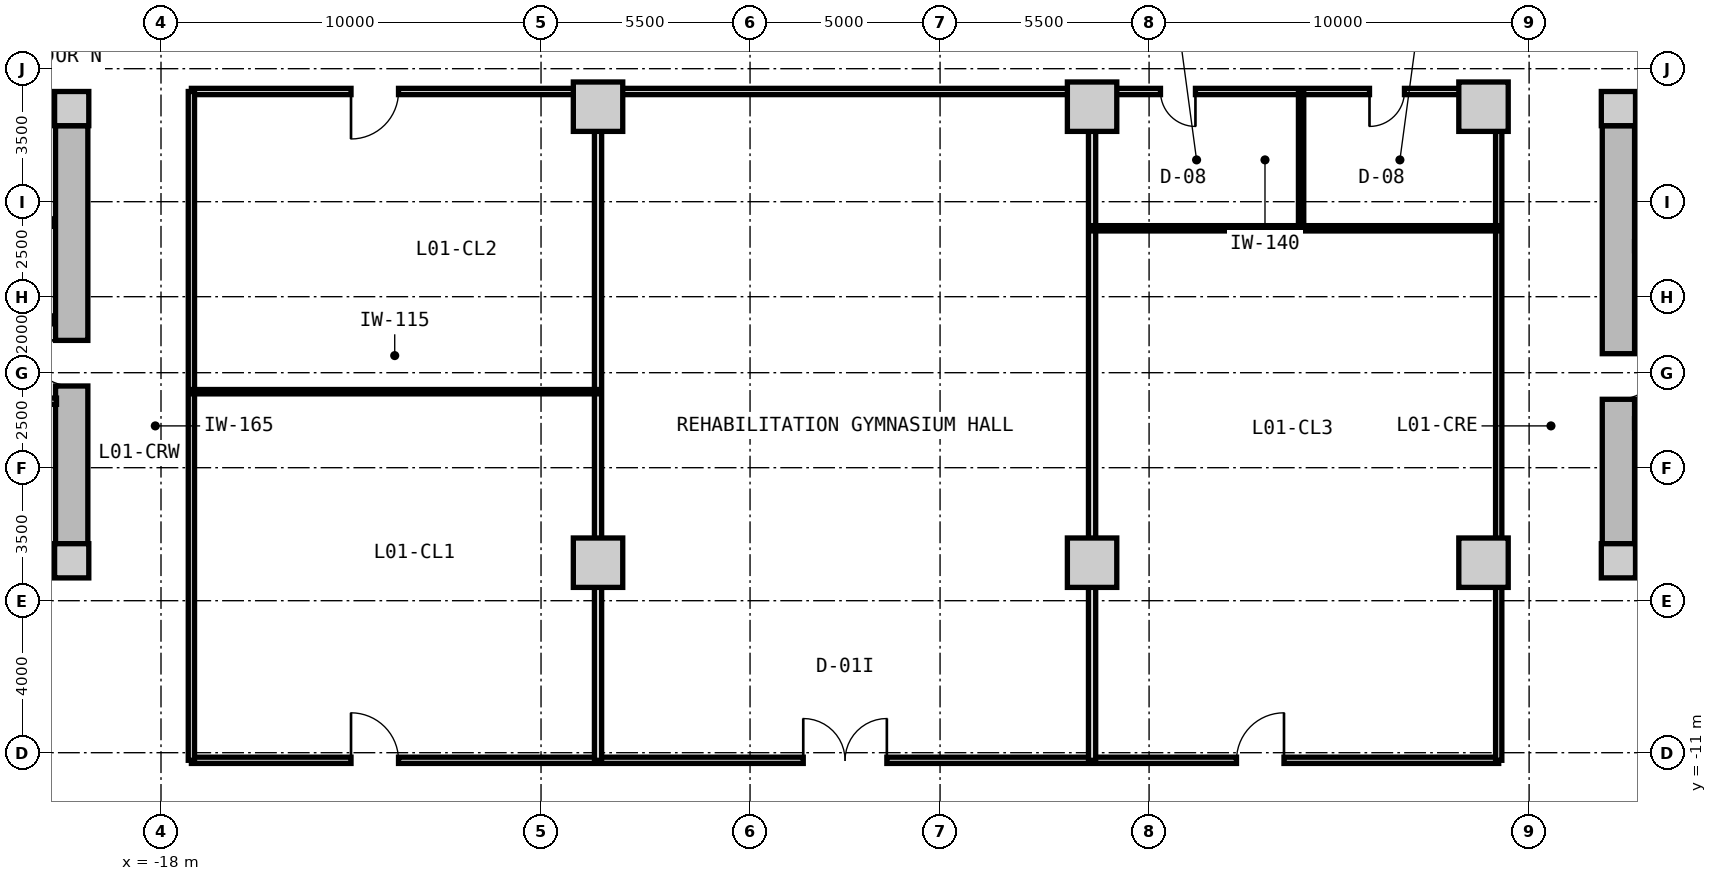
"""IFC4 building model, lengths in metres.
Left out: names, types, materials, properties, quantities, classifications, styles, units other than length and angle.
Written with IfcOpenShell. Run it as: python <this file> out.ifc"""

import sys

from ifc_helpers import new_model, si_unit, direction, frame, frame_2d, origin, origin_2d, place, context, subcontext, project, spatial, rectangle, extrude, source, transform, mapped, element, fill, save


model = new_model("IFC4")
c1 = context("Model", 3, precision=1e-05, world=origin(), true_north=direction((0.0, 1.0)))
c2 = subcontext(c1, "Body", "Model", "MODEL_VIEW")
j1 = project(units=[si_unit("LENGTHUNIT", "METRE"), si_unit("PLANEANGLEUNIT", "RADIAN")], contexts=[c1])
p1 = place(None, origin())
s1 = spatial("IfcSite", under=j1, at=p1, CompositionType="ELEMENT")
p2 = place(p1, origin())
s2 = spatial("IfcBuilding", under=s1, at=p2, CompositionType="ELEMENT")
p3 = place(p2, frame((0.0, 0.0, 4.2)))
s3 = spatial("IfcBuildingStorey", under=s2, at=p3, CompositionType="ELEMENT", Elevation=4.2)
m1 = source(origin(), c2, "Body", "SweptSolid", [
    extrude(rectangle(XDim=0.9, YDim=0.9, at=origin_2d()), origin(), (0.0, 0.0, 1.0), 4.2),
])
for number, where, z_axis, x_axis in (
    (1, (-20.35, -5.95, 0.0), (0.0, 0.0, 1.0), (1.0, 0.0, 0.0)),
    (2, (-20.35, 5.95, 0.0), (0.0, 0.0, 1.0), (1.0, 0.0, 0.0)),
):
    element("IfcColumn", number, at=place(p3, frame(where, z_axis=z_axis, x_axis=x_axis)), inside=s3, PredefinedType="COLUMN", context=c2, shape_type="MappedRepresentation", body=[
        mapped(m1, transform((0.0, 0.0, 0.0), x_axis=(1.0, 0.0, 0.0), y_axis=(0.0, 1.0, 0.0), z_axis=(0.0, 0.0, 1.0), scale=1.0)),
    ])
m2 = source(origin(), c2, "Body", "SweptSolid", [
    extrude(rectangle(XDim=14.4, YDim=0.85, at=frame_2d((7.2, 0.0))), origin(), (0.0, 0.0, 1.0), 3.88),
])
for number, where, z_axis, x_axis in (
    (3, (-35.2, 5.95, 0.0), (0.0, 0.0, 1.0), (1.0, 0.0, 0.0)),
    (4, (-20.8, -5.95, 0.0), (0.0, 0.0, 1.0), (-1.0, 0.0, 0.0)),
):
    element("IfcWall", number, at=place(p3, frame(where, z_axis=z_axis, x_axis=x_axis)), inside=s3, PredefinedType="SHEAR", context=c2, shape_type="MappedRepresentation", body=[
        mapped(m2, transform((0.0, 0.0, 0.0), x_axis=(1.0, 0.0, 0.0), y_axis=(0.0, 1.0, 0.0), z_axis=(0.0, 0.0, 1.0), scale=1.0)),
    ])
m3 = source(origin(), c2, "Body", "SweptSolid", [
    extrude(rectangle(XDim=11.0, YDim=0.85, at=frame_2d((5.5, 0.0))), origin(), (0.0, 0.0, 1.0), 3.88),
])
p4 = place(p3, frame((-20.35, 5.5, 0.0), z_axis=(0.0, 0.0, 1.0), x_axis=(0.0, -1.0, 0.0)))
e5 = element("IfcWall", 5, at=p4, inside=s3, PredefinedType="SHEAR", context=c2, shape_type="MappedRepresentation", body=[
    mapped(m3, transform((0.0, 0.0, 0.0), x_axis=(1.0, 0.0, 0.0), y_axis=(0.0, 1.0, 0.0), z_axis=(0.0, 0.0, 1.0), scale=1.0)),
])
p5 = place(p4, frame((5.65, 0.0, 0.0)))
e6 = element("IfcOpeningElement", 6, at=p5, cuts=e5, PredefinedType="OPENING", context=c2, shape_type="SweptSolid", body=[
    extrude(rectangle(XDim=1.2, YDim=2.15, at=frame_2d((0.6, 1.075))), frame((0.0, 0.435, 0.0), z_axis=(0.0, -1.0, 0.0), x_axis=(1.0, 0.0, 0.0)), (0.0, 0.0, 1.0), 0.87),
])
for number, where, z_axis, x_axis in (
    (7, (20.35, -5.95, 0.0), (0.0, 0.0, 1.0), (1.0, 0.0, 0.0)),
    (8, (20.35, 5.95, 0.0), (0.0, 0.0, 1.0), (1.0, 0.0, 0.0)),
):
    element("IfcColumn", number, at=place(p3, frame(where, z_axis=z_axis, x_axis=x_axis)), inside=s3, PredefinedType="COLUMN", context=c2, shape_type="MappedRepresentation", body=[
        mapped(m1, transform((0.0, 0.0, 0.0), x_axis=(1.0, 0.0, 0.0), y_axis=(0.0, 1.0, 0.0), z_axis=(0.0, 0.0, 1.0), scale=1.0)),
    ])
for number, where, z_axis, x_axis in (
    (9, (20.8, 5.95, 0.0), (0.0, 0.0, 1.0), (1.0, 0.0, 0.0)),
    (10, (35.2, -5.95, 0.0), (0.0, 0.0, 1.0), (-1.0, 0.0, 0.0)),
):
    element("IfcWall", number, at=place(p3, frame(where, z_axis=z_axis, x_axis=x_axis)), inside=s3, PredefinedType="SHEAR", context=c2, shape_type="MappedRepresentation", body=[
        mapped(m2, transform((0.0, 0.0, 0.0), x_axis=(1.0, 0.0, 0.0), y_axis=(0.0, 1.0, 0.0), z_axis=(0.0, 0.0, 1.0), scale=1.0)),
    ])
p6 = place(p3, frame((20.35, -5.5, 0.0), z_axis=(0.0, 0.0, 1.0), x_axis=(0.0, 1.0, 0.0)))
e11 = element("IfcWall", 11, at=p6, inside=s3, PredefinedType="SHEAR", context=c2, shape_type="MappedRepresentation", body=[
    mapped(m3, transform((0.0, 0.0, 0.0), x_axis=(1.0, 0.0, 0.0), y_axis=(0.0, 1.0, 0.0), z_axis=(0.0, 0.0, 1.0), scale=1.0)),
])
p7 = place(p6, frame((3.8, 0.0, 0.0)))
e12 = element("IfcOpeningElement", 12, at=p7, cuts=e11, PredefinedType="OPENING", context=c2, shape_type="SweptSolid", body=[
    extrude(rectangle(XDim=1.2, YDim=2.15, at=frame_2d((0.6, 1.075))), frame((0.0, 0.435, 0.0), z_axis=(0.0, -1.0, 0.0), x_axis=(1.0, 0.0, 0.0)), (0.0, 0.0, 1.0), 0.87),
])
m4 = source(origin(), c2, "Body", "SweptSolid", [
    extrude(rectangle(XDim=1.3, YDim=1.3, at=origin_2d()), origin(), (0.0, 0.0, 1.0), 4.2),
])
for number, where, z_axis, x_axis in (
    (13, (-6.5, -6.0, 0.0), (0.0, 0.0, 1.0), (1.0, 0.0, 0.0)),
    (14, (-6.5, 6.0, 0.0), (0.0, 0.0, 1.0), (1.0, 0.0, 0.0)),
    (15, (6.5, -6.0, 0.0), (0.0, 0.0, 1.0), (1.0, 0.0, 0.0)),
    (16, (6.5, 6.0, 0.0), (0.0, 0.0, 1.0), (1.0, 0.0, 0.0)),
    (17, (16.8, -6.0, 0.0), (0.0, 0.0, 1.0), (1.0, 0.0, 0.0)),
    (18, (16.8, 6.0, 0.0), (0.0, 0.0, 1.0), (1.0, 0.0, 0.0)),
):
    element("IfcColumn", number, at=place(p3, frame(where, z_axis=z_axis, x_axis=x_axis)), inside=s3, PredefinedType="COLUMN", context=c2, shape_type="MappedRepresentation", body=[
        mapped(m4, transform((0.0, 0.0, 0.0), x_axis=(1.0, 0.0, 0.0), y_axis=(0.0, 1.0, 0.0), z_axis=(0.0, 0.0, 1.0), scale=1.0)),
    ])
m5 = source(origin(), c2, "Body", "SweptSolid", [
    extrude(rectangle(XDim=3.2, YDim=0.2, at=frame_2d((1.6, 0.0))), origin(), (0.0, 0.0, 1.0), 3.865),
])
p8 = place(p3, frame((-24.0, 2.95, 0.0), z_axis=(0.0, 0.0, 1.0), x_axis=(1.0, 0.0, 0.0)))
e19 = element("IfcWall", 19, at=p8, inside=s3, PredefinedType="PARTITIONING", context=c2, shape_type="MappedRepresentation", body=[
    mapped(m5, transform((0.0, 0.0, 0.0), x_axis=(1.0, 0.0, 0.0), y_axis=(0.0, 1.0, 0.0), z_axis=(0.0, 0.0, 1.0), scale=1.0)),
])
m6 = source(origin(), c2, "Body", "SweptSolid", [
    extrude(rectangle(XDim=6.66, YDim=0.21, at=frame_2d((3.33, 0.0))), origin(), (0.0, 0.0, 1.0), 3.865),
])
p9 = place(p3, frame((-27.46, 0.39, 0.0), z_axis=(0.0, 0.0, 1.0), x_axis=(1.0, 0.0, 0.0)))
e20 = element("IfcWall", 20, at=p9, inside=s3, PredefinedType="PARTITIONING", context=c2, shape_type="MappedRepresentation", body=[
    mapped(m6, transform((0.0, 0.0, 0.0), x_axis=(1.0, 0.0, 0.0), y_axis=(0.0, 1.0, 0.0), z_axis=(0.0, 0.0, 1.0), scale=1.0)),
])
p10 = place(p9, frame((1.0, 0.0, 0.0)))
e21 = element("IfcOpeningElement", 21, at=p10, cuts=e20, PredefinedType="OPENING", context=c2, shape_type="SweptSolid", body=[
    extrude(rectangle(XDim=1.2, YDim=2.15, at=frame_2d((0.6, 1.075))), frame((0.0, 0.115, 0.0), z_axis=(0.0, -1.0, 0.0), x_axis=(1.0, 0.0, 0.0)), (0.0, 0.0, 1.0), 0.23),
])
m7 = source(origin(), c2, "Body", "SweptSolid", [
    extrude(rectangle(XDim=2.7, YDim=0.165, at=frame_2d((1.35, 0.0))), origin(), (0.0, 0.0, 1.0), 3.865),
])
p11 = place(p3, frame((-23.45, -1.75, 0.0), z_axis=(0.0, 0.0, 1.0), x_axis=(1.0, 0.0, 0.0)))
e22 = element("IfcWall", 22, at=p11, inside=s3, PredefinedType="PARTITIONING", context=c2, shape_type="MappedRepresentation", body=[
    mapped(m7, transform((0.0, 0.0, 0.0), x_axis=(1.0, 0.0, 0.0), y_axis=(0.0, 1.0, 0.0), z_axis=(0.0, 0.0, 1.0), scale=1.0)),
])
p12 = place(p11, frame((0.85, 0.0, 0.0)))
e23 = element("IfcOpeningElement", 23, at=p12, cuts=e22, PredefinedType="OPENING", context=c2, shape_type="SweptSolid", body=[
    extrude(rectangle(XDim=0.925, YDim=2.1, at=frame_2d((0.462, 1.05))), frame((0.0, 0.093, 0.0), z_axis=(0.0, -1.0, 0.0), x_axis=(1.0, 0.0, 0.0)), (0.0, 0.0, 1.0), 0.185),
])
m8 = source(origin(), c2, "Body", "SweptSolid", [
    extrude(rectangle(XDim=7.765, YDim=0.24, at=frame_2d((3.883, 0.0))), origin(), (0.0, 0.0, 1.0), 3.88),
])
p13 = place(p3, frame((20.775, 2.33, 0.0), z_axis=(0.0, 0.0, 1.0), x_axis=(1.0, 0.0, 0.0)))
e24 = element("IfcWall", 24, at=p13, inside=s3, PredefinedType="PARTITIONING", context=c2, shape_type="MappedRepresentation", body=[
    mapped(m8, transform((0.0, 0.0, 0.0), x_axis=(1.0, 0.0, 0.0), y_axis=(0.0, 1.0, 0.0), z_axis=(0.0, 0.0, 1.0), scale=1.0)),
])
p14 = place(p3, frame((20.775, -2.33, 0.0), z_axis=(0.0, 0.0, 1.0), x_axis=(1.0, 0.0, 0.0)))
e25 = element("IfcWall", 25, at=p14, inside=s3, PredefinedType="PARTITIONING", context=c2, shape_type="MappedRepresentation", body=[
    mapped(m8, transform((0.0, 0.0, 0.0), x_axis=(1.0, 0.0, 0.0), y_axis=(0.0, 1.0, 0.0), z_axis=(0.0, 0.0, 1.0), scale=1.0)),
])
p15 = place(p14, frame((0.885, 0.0, 0.0)))
e26 = element("IfcOpeningElement", 26, at=p15, cuts=e25, PredefinedType="OPENING", context=c2, shape_type="SweptSolid", body=[
    extrude(rectangle(XDim=1.1, YDim=2.15, at=frame_2d((0.55, 1.075))), frame((0.0, 0.13, 0.0), z_axis=(0.0, -1.0, 0.0), x_axis=(1.0, 0.0, 0.0)), (0.0, 0.0, 1.0), 0.26),
])
m9 = source(origin(), c2, "Body", "SweptSolid", [
    extrude(rectangle(XDim=7.62, YDim=0.24, at=frame_2d((3.81, 0.0))), origin(), (0.0, 0.0, 1.0), 3.865),
])
p16 = place(p3, frame((20.8, -0.13, 0.0), z_axis=(0.0, 0.0, 1.0), x_axis=(1.0, 0.0, 0.0)))
e27 = element("IfcWall", 27, at=p16, inside=s3, PredefinedType="PARTITIONING", context=c2, shape_type="MappedRepresentation", body=[
    mapped(m9, transform((0.0, 0.0, 0.0), x_axis=(1.0, 0.0, 0.0), y_axis=(0.0, 1.0, 0.0), z_axis=(0.0, 0.0, 1.0), scale=1.0)),
])
p17 = place(p16, frame((6.22, 0.0, 0.0)))
e28 = element("IfcOpeningElement", 28, at=p17, cuts=e27, PredefinedType="OPENING", context=c2, shape_type="SweptSolid", body=[
    extrude(rectangle(XDim=1.0, YDim=2.1, at=frame_2d((0.5, 1.05))), frame((0.0, 0.13, 0.0), z_axis=(0.0, -1.0, 0.0), x_axis=(1.0, 0.0, 0.0)), (0.0, 0.0, 1.0), 0.26),
])
p18 = place(p16, frame((0.85, 0.0, 0.0)))
e29 = element("IfcOpeningElement", 29, at=p18, cuts=e27, PredefinedType="OPENING", context=c2, shape_type="SweptSolid", body=[
    extrude(rectangle(XDim=1.1, YDim=2.2, at=frame_2d((0.55, 1.1))), frame((0.0, 0.13, 0.0), z_axis=(0.0, -1.0, 0.0), x_axis=(1.0, 0.0, 0.0)), (0.0, 0.0, 1.0), 0.26),
])
p19 = place(p16, frame((3.85, 0.0, 0.0)))
e30 = element("IfcOpeningElement", 30, at=p19, cuts=e27, PredefinedType="OPENING", context=c2, shape_type="SweptSolid", body=[
    extrude(rectangle(XDim=1.1, YDim=2.2, at=frame_2d((0.55, 1.1))), frame((0.0, 0.13, 0.0), z_axis=(0.0, -1.0, 0.0), x_axis=(1.0, 0.0, 0.0)), (0.0, 0.0, 1.0), 0.26),
])
m10 = source(origin(), c2, "Body", "SweptSolid", [
    extrude(rectangle(XDim=34.4, YDim=0.165, at=frame_2d((17.2, 0.0))), origin(), (0.0, 0.0, 1.0), 3.865),
])
p20 = place(p3, frame((-17.2, -11.2, 0.0), z_axis=(0.0, 0.0, 1.0), x_axis=(1.0, 0.0, 0.0)))
e31 = element("IfcWall", 31, at=p20, inside=s3, PredefinedType="PARTITIONING", context=c2, shape_type="MappedRepresentation", body=[
    mapped(m10, transform((0.0, 0.0, 0.0), x_axis=(1.0, 0.0, 0.0), y_axis=(0.0, 1.0, 0.0), z_axis=(0.0, 0.0, 1.0), scale=1.0)),
])
p21 = place(p20, frame((4.2, 0.0, 0.0)))
e32 = element("IfcOpeningElement", 32, at=p21, cuts=e31, PredefinedType="OPENING", context=c2, shape_type="SweptSolid", body=[
    extrude(rectangle(XDim=1.25, YDim=2.2, at=frame_2d((0.625, 1.1))), frame((0.0, 0.093, 0.0), z_axis=(0.0, -1.0, 0.0), x_axis=(1.0, 0.0, 0.0)), (0.0, 0.0, 1.0), 0.185),
])
p22 = place(p20, frame((16.1, 0.0, 0.0)))
e33 = element("IfcOpeningElement", 33, at=p22, cuts=e31, PredefinedType="OPENING", context=c2, shape_type="SweptSolid", body=[
    extrude(rectangle(XDim=2.2, YDim=2.4, at=frame_2d((1.1, 1.2))), frame((0.0, 0.093, 0.0), z_axis=(0.0, -1.0, 0.0), x_axis=(1.0, 0.0, 0.0)), (0.0, 0.0, 1.0), 0.185),
])
p23 = place(p20, frame((27.5, 0.0, 0.0)))
e34 = element("IfcOpeningElement", 34, at=p23, cuts=e31, PredefinedType="OPENING", context=c2, shape_type="SweptSolid", body=[
    extrude(rectangle(XDim=1.25, YDim=2.2, at=frame_2d((0.625, 1.1))), frame((0.0, 0.093, 0.0), z_axis=(0.0, -1.0, 0.0), x_axis=(1.0, 0.0, 0.0)), (0.0, 0.0, 1.0), 0.185),
])
p24 = place(p3, frame((-17.2, 6.4, 0.0), z_axis=(0.0, 0.0, 1.0), x_axis=(1.0, 0.0, 0.0)))
e35 = element("IfcWall", 35, at=p24, inside=s3, PredefinedType="PARTITIONING", context=c2, shape_type="MappedRepresentation", body=[
    mapped(m10, transform((0.0, 0.0, 0.0), x_axis=(1.0, 0.0, 0.0), y_axis=(0.0, 1.0, 0.0), z_axis=(0.0, 0.0, 1.0), scale=1.0)),
])
p25 = place(p24, frame((4.2, 0.0, 0.0)))
e36 = element("IfcOpeningElement", 36, at=p25, cuts=e35, PredefinedType="OPENING", context=c2, shape_type="SweptSolid", body=[
    extrude(rectangle(XDim=1.25, YDim=2.2, at=frame_2d((0.625, 1.1))), frame((0.0, 0.093, 0.0), z_axis=(0.0, -1.0, 0.0), x_axis=(1.0, 0.0, 0.0)), (0.0, 0.0, 1.0), 0.185),
])
p26 = place(p24, frame((25.5, 0.0, 0.0)))
e37 = element("IfcOpeningElement", 37, at=p26, cuts=e35, PredefinedType="OPENING", context=c2, shape_type="SweptSolid", body=[
    extrude(rectangle(XDim=0.92, YDim=2.1, at=frame_2d((0.46, 1.05))), frame((0.0, 0.093, 0.0), z_axis=(0.0, -1.0, 0.0), x_axis=(1.0, 0.0, 0.0)), (0.0, 0.0, 1.0), 0.185),
])
p27 = place(p24, frame((31.0, 0.0, 0.0)))
e38 = element("IfcOpeningElement", 38, at=p27, cuts=e35, PredefinedType="OPENING", context=c2, shape_type="SweptSolid", body=[
    extrude(rectangle(XDim=0.92, YDim=2.1, at=frame_2d((0.46, 1.05))), frame((0.0, 0.093, 0.0), z_axis=(0.0, -1.0, 0.0), x_axis=(1.0, 0.0, 0.0)), (0.0, 0.0, 1.0), 0.185),
])
m11 = source(origin(), c2, "Body", "SweptSolid", [
    extrude(rectangle(XDim=17.6, YDim=0.165, at=frame_2d((8.8, 0.0))), origin(), (0.0, 0.0, 1.0), 3.865),
])
for number, where, z_axis, x_axis in (
    (39, (-17.2, -11.2, 0.0), (0.0, 0.0, 1.0), (0.0, 1.0, 0.0)),
    (40, (17.2, -11.2, 0.0), (0.0, 0.0, 1.0), (0.0, 1.0, 0.0)),
):
    element("IfcWall", number, at=place(p3, frame(where, z_axis=z_axis, x_axis=x_axis)), inside=s3, PredefinedType="PARTITIONING", context=c2, shape_type="MappedRepresentation", body=[
        mapped(m11, transform((0.0, 0.0, 0.0), x_axis=(1.0, 0.0, 0.0), y_axis=(0.0, 1.0, 0.0), z_axis=(0.0, 0.0, 1.0), scale=1.0)),
    ])
m12 = source(origin(), c2, "Body", "SweptSolid", [
    extrude(rectangle(XDim=17.6, YDim=0.19, at=frame_2d((8.8, 0.0))), origin(), (0.0, 0.0, 1.0), 3.215),
])
for number, where, z_axis, x_axis in (
    (41, (-6.5, -11.2, 0.0), (0.0, 0.0, 1.0), (0.0, 1.0, 0.0)),
    (42, (6.5, -11.2, 0.0), (0.0, 0.0, 1.0), (0.0, 1.0, 0.0)),
):
    element("IfcWall", number, at=place(p3, frame(where, z_axis=z_axis, x_axis=x_axis)), inside=s3, PredefinedType="PARTITIONING", context=c2, shape_type="MappedRepresentation", body=[
        mapped(m12, transform((0.0, 0.0, 0.0), x_axis=(1.0, 0.0, 0.0), y_axis=(0.0, 1.0, 0.0), z_axis=(0.0, 0.0, 1.0), scale=1.0)),
    ])
m13 = source(origin(), c2, "Body", "SweptSolid", [
    extrude(rectangle(XDim=10.7, YDim=0.115, at=frame_2d((5.35, 0.0))), origin(), (0.0, 0.0, 1.0), 3.865),
])
p28 = place(p3, frame((-17.2, -1.5, 0.0), z_axis=(0.0, 0.0, 1.0), x_axis=(1.0, 0.0, 0.0)))
e43 = element("IfcWall", 43, at=p28, inside=s3, PredefinedType="PARTITIONING", context=c2, shape_type="MappedRepresentation", body=[
    mapped(m13, transform((0.0, 0.0, 0.0), x_axis=(1.0, 0.0, 0.0), y_axis=(0.0, 1.0, 0.0), z_axis=(0.0, 0.0, 1.0), scale=1.0)),
])
m14 = source(origin(), c2, "Body", "SweptSolid", [
    extrude(rectangle(XDim=3.6, YDim=0.14, at=frame_2d((1.8, 0.0))), origin(), (0.0, 0.0, 1.0), 3.865),
])
p29 = place(p3, frame((12.0, 2.8, 0.0), z_axis=(0.0, 0.0, 1.0), x_axis=(0.0, 1.0, 0.0)))
e44 = element("IfcWall", 44, at=p29, inside=s3, PredefinedType="PARTITIONING", context=c2, shape_type="MappedRepresentation", body=[
    mapped(m14, transform((0.0, 0.0, 0.0), x_axis=(1.0, 0.0, 0.0), y_axis=(0.0, 1.0, 0.0), z_axis=(0.0, 0.0, 1.0), scale=1.0)),
])
m15 = source(origin(), c2, "Body", "SweptSolid", [
    extrude(rectangle(XDim=10.7, YDim=0.14, at=frame_2d((5.35, 0.0))), origin(), (0.0, 0.0, 1.0), 3.865),
])
p30 = place(p3, frame((6.5, 2.8, 0.0), z_axis=(0.0, 0.0, 1.0), x_axis=(1.0, 0.0, 0.0)))
e45 = element("IfcWall", 45, at=p30, inside=s3, PredefinedType="PARTITIONING", context=c2, shape_type="MappedRepresentation", body=[
    mapped(m15, transform((0.0, 0.0, 0.0), x_axis=(1.0, 0.0, 0.0), y_axis=(0.0, 1.0, 0.0), z_axis=(0.0, 0.0, 1.0), scale=1.0)),
])
m16 = source(origin(), c2, "Body", "SweptSolid", [
    extrude(rectangle(XDim=1.2, YDim=2.15, at=frame_2d((0.6, 1.075))), frame((0.0, 0.025, 0.0), z_axis=(0.0, -1.0, 0.0), x_axis=(1.0, 0.0, 0.0)), (0.0, 0.0, 1.0), 0.05),
])
p31 = place(p5, frame((1.2, 0.0, 0.0), z_axis=(0.0, 0.0, 1.0), x_axis=(-1.0, 0.0, 0.0)))
e46 = element("IfcDoor", 46, at=p31, inside=s3, OperationType="SINGLE_SWING_RIGHT", PredefinedType="DOOR", context=c2, shape_type="MappedRepresentation", body=[
    mapped(m16, transform((0.0, 0.0, 0.0), x_axis=(1.0, 0.0, 0.0), y_axis=(0.0, 1.0, 0.0), z_axis=(0.0, 0.0, 1.0), scale=1.0)),
])
fill(e6, e46)
p32 = place(p7, frame((1.2, 0.0, 0.0), z_axis=(0.0, 0.0, 1.0), x_axis=(-1.0, 0.0, 0.0)))
e47 = element("IfcDoor", 47, at=p32, inside=s3, OperationType="SINGLE_SWING_LEFT", PredefinedType="DOOR", context=c2, shape_type="MappedRepresentation", body=[
    mapped(m16, transform((0.0, 0.0, 0.0), x_axis=(1.0, 0.0, 0.0), y_axis=(0.0, 1.0, 0.0), z_axis=(0.0, 0.0, 1.0), scale=1.0)),
])
fill(e12, e47)
m17 = source(origin(), c2, "Body", "SweptSolid", [
    extrude(rectangle(XDim=1.25, YDim=2.2, at=frame_2d((0.625, 1.1))), frame((0.0, 0.025, 0.0), z_axis=(0.0, -1.0, 0.0), x_axis=(1.0, 0.0, 0.0)), (0.0, 0.0, 1.0), 0.05),
])
p33 = place(p21, origin())
e48 = element("IfcDoor", 48, at=p33, inside=s3, OperationType="SINGLE_SWING_LEFT", PredefinedType="DOOR", context=c2, shape_type="MappedRepresentation", body=[
    mapped(m17, transform((0.0, 0.0, 0.0), x_axis=(1.0, 0.0, 0.0), y_axis=(0.0, 1.0, 0.0), z_axis=(0.0, 0.0, 1.0), scale=1.0)),
])
fill(e32, e48)
m18 = source(origin(), c2, "Body", "SweptSolid", [
    extrude(rectangle(XDim=2.2, YDim=2.4, at=frame_2d((1.1, 1.2))), frame((0.0, 0.025, 0.0), z_axis=(0.0, -1.0, 0.0), x_axis=(1.0, 0.0, 0.0)), (0.0, 0.0, 1.0), 0.05),
])
p34 = place(p22, origin())
e49 = element("IfcDoor", 49, at=p34, inside=s3, OperationType="DOUBLE_DOOR_SINGLE_SWING", PredefinedType="DOOR", context=c2, shape_type="MappedRepresentation", body=[
    mapped(m18, transform((0.0, 0.0, 0.0), x_axis=(1.0, 0.0, 0.0), y_axis=(0.0, 1.0, 0.0), z_axis=(0.0, 0.0, 1.0), scale=1.0)),
])
fill(e33, e49)
p35 = place(p23, origin())
e50 = element("IfcDoor", 50, at=p35, inside=s3, OperationType="SINGLE_SWING_RIGHT", PredefinedType="DOOR", context=c2, shape_type="MappedRepresentation", body=[
    mapped(m17, transform((0.0, 0.0, 0.0), x_axis=(1.0, 0.0, 0.0), y_axis=(0.0, 1.0, 0.0), z_axis=(0.0, 0.0, 1.0), scale=1.0)),
])
fill(e34, e50)
p36 = place(p25, frame((1.25, 0.0, 0.0), z_axis=(0.0, 0.0, 1.0), x_axis=(-1.0, 0.0, 0.0)))
e51 = element("IfcDoor", 51, at=p36, inside=s3, OperationType="SINGLE_SWING_RIGHT", PredefinedType="DOOR", context=c2, shape_type="MappedRepresentation", body=[
    mapped(m17, transform((0.0, 0.0, 0.0), x_axis=(1.0, 0.0, 0.0), y_axis=(0.0, 1.0, 0.0), z_axis=(0.0, 0.0, 1.0), scale=1.0)),
])
fill(e36, e51)
m19 = source(origin(), c2, "Body", "SweptSolid", [
    extrude(rectangle(XDim=0.92, YDim=2.1, at=frame_2d((0.46, 1.05))), frame((0.0, 0.025, 0.0), z_axis=(0.0, -1.0, 0.0), x_axis=(1.0, 0.0, 0.0)), (0.0, 0.0, 1.0), 0.05),
])
p37 = place(p26, frame((0.92, 0.0, 0.0), z_axis=(0.0, 0.0, 1.0), x_axis=(-1.0, 0.0, 0.0)))
e52 = element("IfcDoor", 52, at=p37, inside=s3, OperationType="SINGLE_SWING_LEFT", PredefinedType="DOOR", context=c2, shape_type="MappedRepresentation", body=[
    mapped(m19, transform((0.0, 0.0, 0.0), x_axis=(1.0, 0.0, 0.0), y_axis=(0.0, 1.0, 0.0), z_axis=(0.0, 0.0, 1.0), scale=1.0)),
])
fill(e37, e52)
p38 = place(p27, frame((0.92, 0.0, 0.0), z_axis=(0.0, 0.0, 1.0), x_axis=(-1.0, 0.0, 0.0)))
e53 = element("IfcDoor", 53, at=p38, inside=s3, OperationType="SINGLE_SWING_RIGHT", PredefinedType="DOOR", context=c2, shape_type="MappedRepresentation", body=[
    mapped(m19, transform((0.0, 0.0, 0.0), x_axis=(1.0, 0.0, 0.0), y_axis=(0.0, 1.0, 0.0), z_axis=(0.0, 0.0, 1.0), scale=1.0)),
])
fill(e38, e53)
save(model, sys.argv[1])
